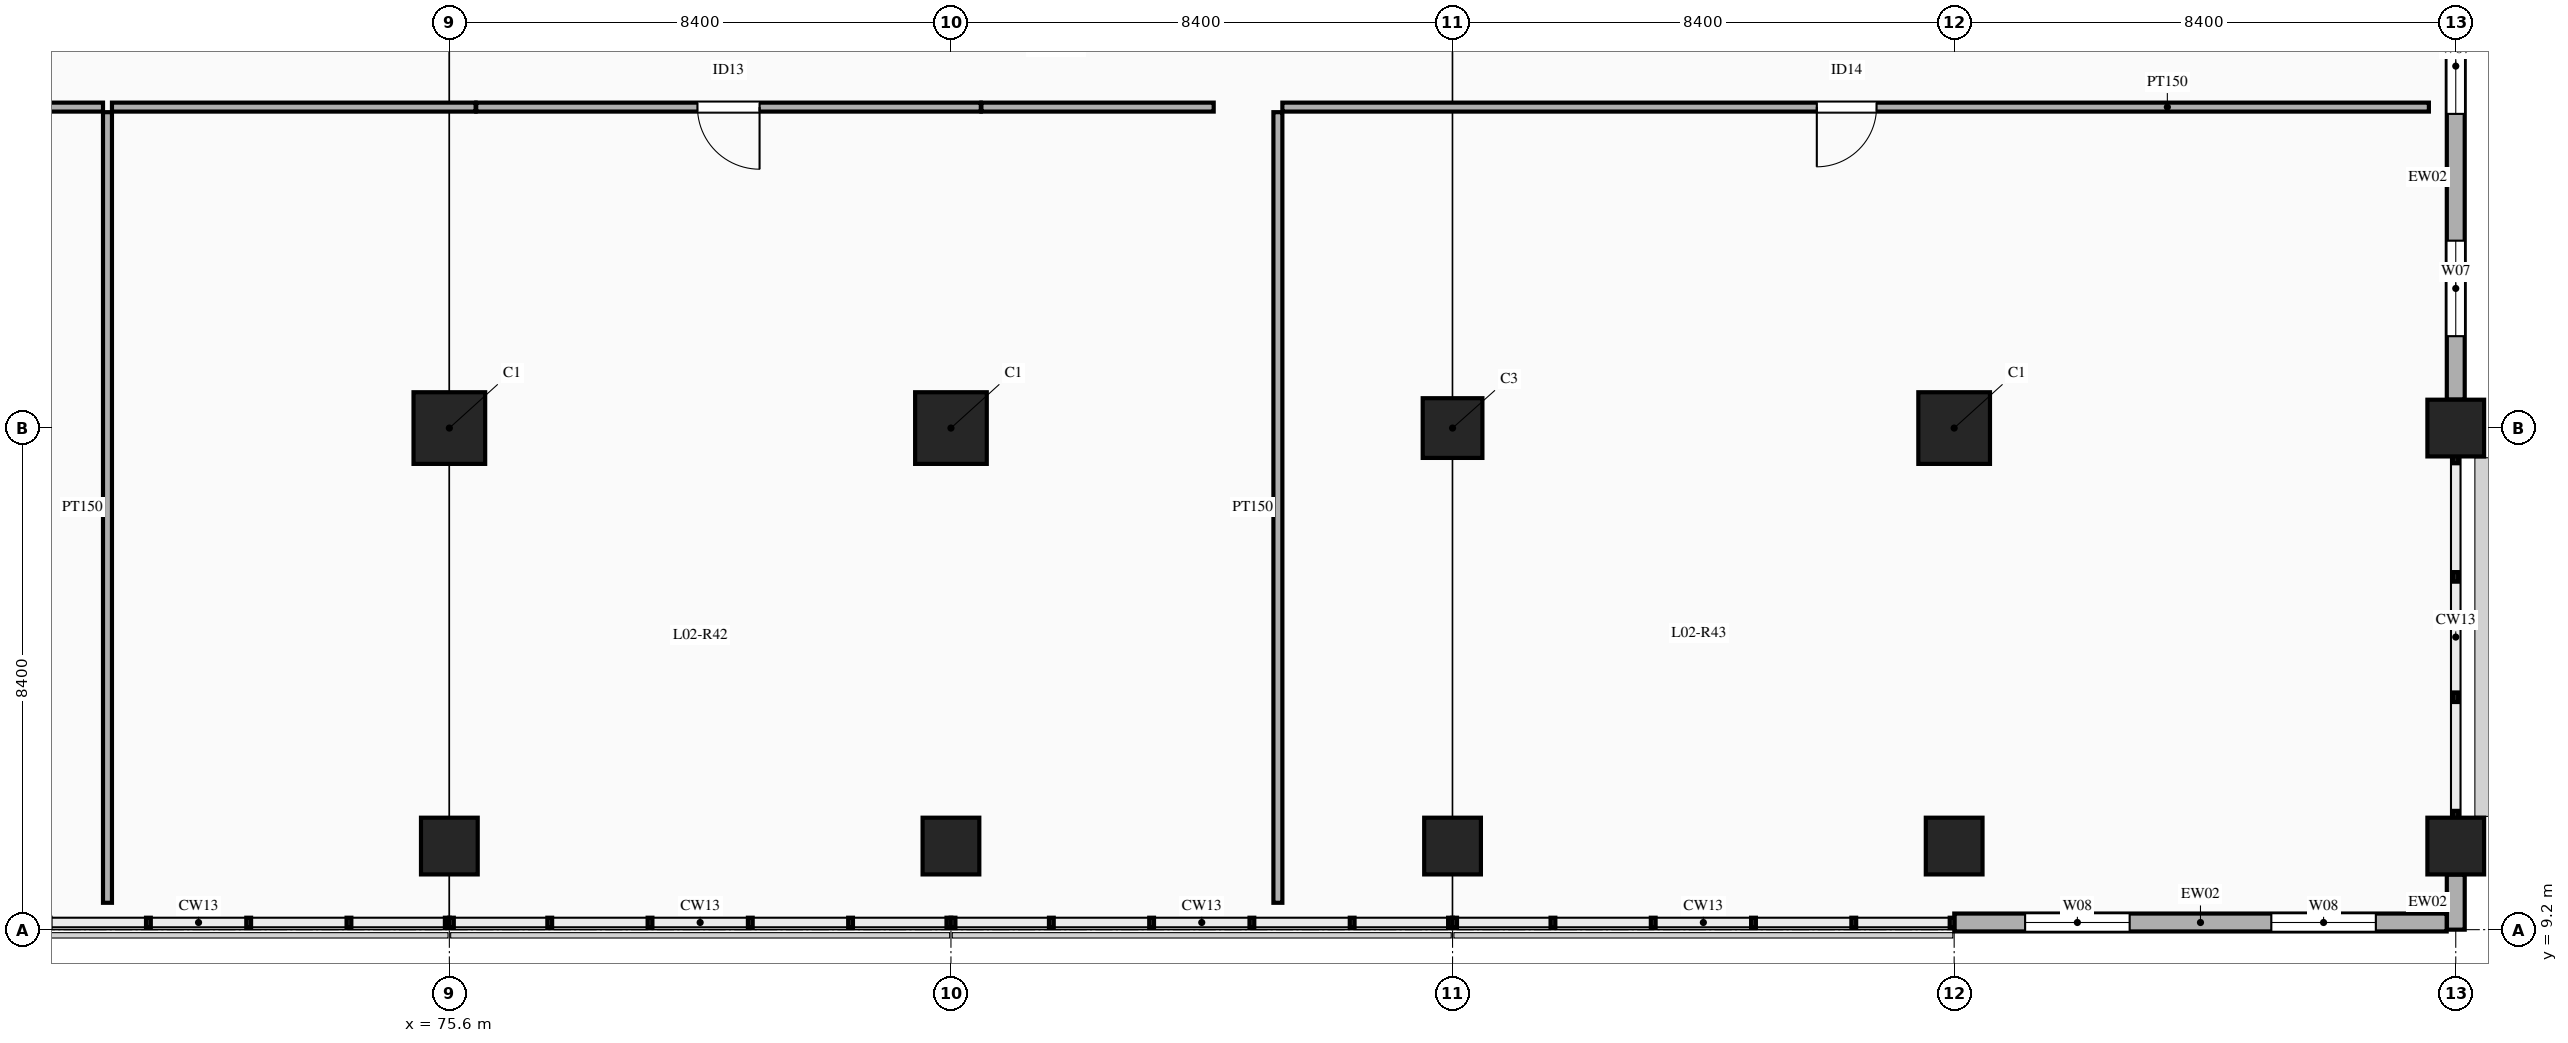
"""IFC4 building model, lengths in metres.
Left out: names, types, materials, properties, quantities, classifications, styles, units other than length and angle.
Written with IfcOpenShell. Run it as: python <this file> out.ifc"""

import sys

from ifc_helpers import new_model, si_unit, direction, frame, frame_2d, origin, origin_2d, place, context, subcontext, project, spatial, rectangle, extrude, element, fill, save


model = new_model("IFC4")
c1 = context("Model", 3, precision=1e-05, world=origin(), true_north=direction((0.0, 1.0)))
c2 = subcontext(c1, "Body", "Model", "MODEL_VIEW")
j1 = project(units=[si_unit("LENGTHUNIT", "METRE"), si_unit("PLANEANGLEUNIT", "RADIAN")], contexts=[c1])
p1 = place(None, origin())
s1 = spatial("IfcSite", under=j1, at=p1, CompositionType="ELEMENT")
p2 = place(p1, origin())
s2 = spatial("IfcBuilding", under=s1, at=p2, CompositionType="ELEMENT")
p3 = place(p2, frame((0.0, 0.0, 10.2)))
s3 = spatial("IfcBuildingStorey", under=s2, at=p3, CompositionType="ELEMENT", Elevation=10.2)
p4 = place(p3, frame((75.6, 10.6, 0.0), z_axis=(0.0, 0.0, 1.0), x_axis=(1.0, 0.0, 0.0)))
e1 = element("IfcColumn", 1, at=p4, inside=s3, PredefinedType="COLUMN", context=c2, shape_type="SweptSolid", body=[
    extrude(rectangle(XDim=0.95, YDim=0.95, at=origin_2d()), origin(), (0.0, 0.0, 1.0), 4.8),
])
p5 = place(p3, frame((75.6, 17.6, 0.0), z_axis=(0.0, 0.0, 1.0), x_axis=(1.0, 0.0, 0.0)))
e2 = element("IfcColumn", 2, at=p5, inside=s3, PredefinedType="COLUMN", context=c2, shape_type="SweptSolid", body=[
    extrude(rectangle(XDim=1.2, YDim=1.2, at=origin_2d()), origin(), (0.0, 0.0, 1.0), 4.8),
])
p6 = place(p3, frame((84.0, 10.6, 0.0), z_axis=(0.0, 0.0, 1.0), x_axis=(1.0, 0.0, 0.0)))
e3 = element("IfcColumn", 3, at=p6, inside=s3, PredefinedType="COLUMN", context=c2, shape_type="SweptSolid", body=[
    extrude(rectangle(XDim=0.95, YDim=0.95, at=origin_2d()), origin(), (0.0, 0.0, 1.0), 4.8),
])
p7 = place(p3, frame((84.0, 17.6, 0.0), z_axis=(0.0, 0.0, 1.0), x_axis=(1.0, 0.0, 0.0)))
e4 = element("IfcColumn", 4, at=p7, inside=s3, PredefinedType="COLUMN", context=c2, shape_type="SweptSolid", body=[
    extrude(rectangle(XDim=1.2, YDim=1.2, at=origin_2d()), origin(), (0.0, 0.0, 1.0), 4.8),
])
p8 = place(p3, frame((92.4, 10.6, 0.0), z_axis=(0.0, 0.0, 1.0), x_axis=(1.0, 0.0, 0.0)))
e5 = element("IfcColumn", 5, at=p8, inside=s3, PredefinedType="COLUMN", context=c2, shape_type="SweptSolid", body=[
    extrude(rectangle(XDim=0.95, YDim=0.95, at=origin_2d()), origin(), (0.0, 0.0, 1.0), 4.8),
])
p9 = place(p3, frame((92.4, 17.6, 0.0), z_axis=(0.0, 0.0, 1.0), x_axis=(1.0, 0.0, 0.0)))
e6 = element("IfcColumn", 6, at=p9, inside=s3, PredefinedType="COLUMN", context=c2, shape_type="SweptSolid", body=[
    extrude(rectangle(XDim=1.0, YDim=1.0, at=origin_2d()), origin(), (0.0, 0.0, 1.0), 4.8),
])
p10 = place(p3, frame((100.8, 10.6, 0.0), z_axis=(0.0, 0.0, 1.0), x_axis=(1.0, 0.0, 0.0)))
e7 = element("IfcColumn", 7, at=p10, inside=s3, PredefinedType="COLUMN", context=c2, shape_type="SweptSolid", body=[
    extrude(rectangle(XDim=0.95, YDim=0.95, at=origin_2d()), origin(), (0.0, 0.0, 1.0), 4.8),
])
p11 = place(p3, frame((100.8, 17.6, 0.0), z_axis=(0.0, 0.0, 1.0), x_axis=(1.0, 0.0, 0.0)))
e8 = element("IfcColumn", 8, at=p11, inside=s3, PredefinedType="COLUMN", context=c2, shape_type="SweptSolid", body=[
    extrude(rectangle(XDim=1.2, YDim=1.2, at=origin_2d()), origin(), (0.0, 0.0, 1.0), 4.8),
])
for number, where, z_axis, x_axis in (
    (9, (109.2, 10.6, 0.0), (0.0, 0.0, 1.0), (1.0, 0.0, 0.0)),
    (10, (109.2, 17.6, 0.0), (0.0, 0.0, 1.0), (1.0, 0.0, 0.0)),
):
    element("IfcColumn", number, at=place(p3, frame(where, z_axis=z_axis, x_axis=x_axis)), inside=s3, PredefinedType="COLUMN", context=c2, shape_type="SweptSolid", body=[
        extrude(rectangle(XDim=0.95, YDim=0.95, at=origin_2d()), origin(), (0.0, 0.0, 1.0), 4.8),
    ])
p12 = place(p3, frame((109.2, 9.2, 0.0), z_axis=(0.0, 0.0, 1.0), x_axis=(0.0, 1.0, 0.0)))
e11 = element("IfcWall", 11, at=p12, inside=s3, PredefinedType="SOLIDWALL", context=c2, shape_type="SweptSolid", body=[
    extrude(rectangle(XDim=0.923, YDim=0.3, at=frame_2d((0.461, 0.0))), origin(), (0.0, 0.0, 1.0), 3.85),
])
p13 = place(p3, frame((100.802, 9.32, 0.0), z_axis=(0.0, 0.0, 1.0), x_axis=(1.0, 0.0, 0.0)))
e12 = element("IfcWall", 12, at=p13, inside=s3, PredefinedType="SOLIDWALL", context=c2, shape_type="SweptSolid", body=[
    extrude(rectangle(XDim=8.246, YDim=0.3, at=frame_2d((4.123, 0.0))), origin(), (0.0, 0.0, 1.0), 3.85),
])
p14 = place(p13, frame((1.187, 0.0, 0.9)))
e13 = element("IfcOpeningElement", 13, at=p14, cuts=e12, PredefinedType="OPENING", context=c2, shape_type="SweptSolid", body=[
    extrude(rectangle(XDim=1.75, YDim=2.2, at=frame_2d((0.875, 1.1))), frame((0.0, 0.16, 0.0), z_axis=(0.0, -1.0, 0.0), x_axis=(1.0, 0.0, 0.0)), (0.0, 0.0, 1.0), 0.32),
])
p15 = place(p13, frame((5.31, 0.0, 0.9)))
e14 = element("IfcOpeningElement", 14, at=p15, cuts=e12, PredefinedType="OPENING", context=c2, shape_type="SweptSolid", body=[
    extrude(rectangle(XDim=1.75, YDim=2.2, at=frame_2d((0.875, 1.1))), frame((0.0, 0.16, 0.0), z_axis=(0.0, -1.0, 0.0), x_axis=(1.0, 0.0, 0.0)), (0.0, 0.0, 1.0), 0.32),
])
p16 = place(p3, frame((109.2, 18.077, 0.0), z_axis=(0.0, 0.0, 1.0), x_axis=(0.0, 1.0, 0.0)))
e15 = element("IfcWall", 15, at=p16, inside=s3, PredefinedType="SOLIDWALL", context=c2, shape_type="SweptSolid", body=[
    extrude(rectangle(XDim=7.446, YDim=0.3, at=frame_2d((3.723, 0.0))), origin(), (0.0, 0.0, 1.0), 3.85),
])
p17 = place(p16, frame((1.062, 0.0, 0.9)))
e16 = element("IfcOpeningElement", 16, at=p17, cuts=e15, PredefinedType="OPENING", context=c2, shape_type="SweptSolid", body=[
    extrude(rectangle(XDim=1.6, YDim=2.1, at=frame_2d((0.8, 1.05))), frame((0.0, 0.16, 0.0), z_axis=(0.0, -1.0, 0.0), x_axis=(1.0, 0.0, 0.0)), (0.0, 0.0, 1.0), 0.32),
])
p18 = place(p16, frame((4.784, 0.0, 0.9)))
e17 = element("IfcOpeningElement", 17, at=p18, cuts=e15, PredefinedType="OPENING", context=c2, shape_type="SweptSolid", body=[
    extrude(rectangle(XDim=1.6, YDim=2.1, at=frame_2d((0.8, 1.05))), frame((0.0, 0.16, 0.0), z_axis=(0.0, -1.0, 0.0), x_axis=(1.0, 0.0, 0.0)), (0.0, 0.0, 1.0), 0.32),
])
p19 = place(p3, frame((76.05, 22.975, 0.0), z_axis=(0.0, 0.0, 1.0), x_axis=(1.0, 0.0, 0.0)))
e18 = element("IfcWall", 18, at=p19, inside=s3, PredefinedType="PARTITIONING", context=c2, shape_type="SweptSolid", body=[
    extrude(rectangle(XDim=8.45, YDim=0.15, at=frame_2d((4.225, 0.0))), origin(), (0.0, 0.0, 1.0), 3.75),
])
p20 = place(p19, frame((3.705, 0.0, 0.0)))
e19 = element("IfcOpeningElement", 19, at=p20, cuts=e18, PredefinedType="OPENING", context=c2, shape_type="SweptSolid", body=[
    extrude(rectangle(XDim=1.04, YDim=2.15, at=frame_2d((0.52, 1.075))), frame((0.0, 0.085, 0.0), z_axis=(0.0, -1.0, 0.0), x_axis=(1.0, 0.0, 0.0)), (0.0, 0.0, 1.0), 0.17),
])
p21 = place(p3, frame((84.51, 22.975, 0.0), z_axis=(0.0, 0.0, 1.0), x_axis=(1.0, 0.0, 0.0)))
e20 = element("IfcWall", 20, at=p21, inside=s3, PredefinedType="PARTITIONING", context=c2, shape_type="SweptSolid", body=[
    extrude(rectangle(XDim=3.89, YDim=0.15, at=frame_2d((1.945, 0.0))), origin(), (0.0, 0.0, 1.0), 3.75),
])
p22 = place(p3, frame((50.85, 22.975, 0.0), z_axis=(0.0, 0.0, 1.0), x_axis=(1.0, 0.0, 0.0)))
e21 = element("IfcWall", 21, at=p22, inside=s3, PredefinedType="PARTITIONING", context=c2, shape_type="SweptSolid", body=[
    extrude(rectangle(XDim=18.95, YDim=0.15, at=frame_2d((9.475, 0.0))), origin(), (0.0, 0.0, 1.0), 3.75),
])
p23 = place(p22, frame((9.276, 0.0, 0.0)))
e22 = element("IfcOpeningElement", 22, at=p23, cuts=e21, PredefinedType="OPENING", context=c2, shape_type="SweptSolid", body=[
    extrude(rectangle(XDim=1.0, YDim=2.15, at=frame_2d((0.5, 1.075))), frame((0.0, 0.085, 0.0), z_axis=(0.0, -1.0, 0.0), x_axis=(1.0, 0.0, 0.0)), (0.0, 0.0, 1.0), 0.17),
])
p24 = place(p3, frame((69.95, 22.975, 0.0), z_axis=(0.0, 0.0, 1.0), x_axis=(1.0, 0.0, 0.0)))
e23 = element("IfcWall", 23, at=p24, inside=s3, PredefinedType="PARTITIONING", context=c2, shape_type="SweptSolid", body=[
    extrude(rectangle(XDim=6.09, YDim=0.15, at=frame_2d((3.045, 0.0))), origin(), (0.0, 0.0, 1.0), 3.75),
])
p25 = place(p3, frame((89.55, 22.975, 0.0), z_axis=(0.0, 0.0, 1.0), x_axis=(1.0, 0.0, 0.0)))
e24 = element("IfcWall", 24, at=p25, inside=s3, PredefinedType="PARTITIONING", context=c2, shape_type="SweptSolid", body=[
    extrude(rectangle(XDim=19.2, YDim=0.15, at=frame_2d((9.6, 0.0))), origin(), (0.0, 0.0, 1.0), 3.75),
])
p26 = place(p25, frame((8.95, 0.0, 0.0)))
e25 = element("IfcOpeningElement", 25, at=p26, cuts=e24, PredefinedType="OPENING", context=c2, shape_type="SweptSolid", body=[
    extrude(rectangle(XDim=1.0, YDim=2.15, at=frame_2d((0.5, 1.075))), frame((0.0, 0.085, 0.0), z_axis=(0.0, -1.0, 0.0), x_axis=(1.0, 0.0, 0.0)), (0.0, 0.0, 1.0), 0.17),
])
for number, where, z_axis, x_axis in (
    (26, (69.875, 9.65, 0.0), (0.0, 0.0, 1.0), (0.0, 1.0, 0.0)),
    (27, (89.475, 9.65, 0.0), (0.0, 0.0, 1.0), (0.0, 1.0, 0.0)),
):
    element("IfcWall", number, at=place(p3, frame(where, z_axis=z_axis, x_axis=x_axis)), inside=s3, PredefinedType="PARTITIONING", context=c2, shape_type="SweptSolid", body=[
        extrude(rectangle(XDim=13.24, YDim=0.15, at=frame_2d((6.62, 0.0))), origin(), (0.0, 0.0, 1.0), 3.75),
    ])
p27 = place(p14, origin())
e28 = element("IfcWindow", 28, at=p27, inside=s3, PartitioningType="DOUBLE_PANEL_VERTICAL", PredefinedType="WINDOW", context=c2, shape_type="SweptSolid", body=[
    extrude(rectangle(XDim=1.75, YDim=2.2, at=frame_2d((0.875, 1.1))), frame((0.0, 0.03, 0.0), z_axis=(0.0, -1.0, 0.0), x_axis=(1.0, 0.0, 0.0)), (0.0, 0.0, 1.0), 0.06),
])
fill(e13, e28)
p28 = place(p15, origin())
e29 = element("IfcWindow", 29, at=p28, inside=s3, PartitioningType="DOUBLE_PANEL_VERTICAL", PredefinedType="WINDOW", context=c2, shape_type="SweptSolid", body=[
    extrude(rectangle(XDim=1.75, YDim=2.2, at=frame_2d((0.875, 1.1))), frame((0.0, 0.03, 0.0), z_axis=(0.0, -1.0, 0.0), x_axis=(1.0, 0.0, 0.0)), (0.0, 0.0, 1.0), 0.06),
])
fill(e14, e29)
p29 = place(p17, origin())
e30 = element("IfcWindow", 30, at=p29, inside=s3, PartitioningType="DOUBLE_PANEL_VERTICAL", PredefinedType="WINDOW", context=c2, shape_type="SweptSolid", body=[
    extrude(rectangle(XDim=1.6, YDim=2.1, at=frame_2d((0.8, 1.05))), frame((0.0, 0.03, 0.0), z_axis=(0.0, -1.0, 0.0), x_axis=(1.0, 0.0, 0.0)), (0.0, 0.0, 1.0), 0.06),
])
fill(e16, e30)
p30 = place(p18, origin())
e31 = element("IfcWindow", 31, at=p30, inside=s3, PartitioningType="DOUBLE_PANEL_VERTICAL", PredefinedType="WINDOW", context=c2, shape_type="SweptSolid", body=[
    extrude(rectangle(XDim=1.6, YDim=2.1, at=frame_2d((0.8, 1.05))), frame((0.0, 0.03, 0.0), z_axis=(0.0, -1.0, 0.0), x_axis=(1.0, 0.0, 0.0)), (0.0, 0.0, 1.0), 0.06),
])
fill(e17, e31)
p31 = place(p20, frame((1.04, 0.0, 0.0), z_axis=(0.0, 0.0, 1.0), x_axis=(-1.0, 0.0, 0.0)))
e32 = element("IfcDoor", 32, at=p31, inside=s3, OperationType="SINGLE_SWING_LEFT", PredefinedType="DOOR", context=c2, shape_type="SweptSolid", body=[
    extrude(rectangle(XDim=1.04, YDim=2.15, at=frame_2d((0.52, 1.075))), frame((0.0, 0.025, 0.0), z_axis=(0.0, -1.0, 0.0), x_axis=(1.0, 0.0, 0.0)), (0.0, 0.0, 1.0), 0.05),
])
fill(e19, e32)
p32 = place(p26, frame((1.0, 0.0, 0.0), z_axis=(0.0, 0.0, 1.0), x_axis=(-1.0, 0.0, 0.0)))
e33 = element("IfcDoor", 33, at=p32, inside=s3, OperationType="SINGLE_SWING_RIGHT", PredefinedType="DOOR", context=c2, shape_type="SweptSolid", body=[
    extrude(rectangle(XDim=1.0, YDim=2.15, at=frame_2d((0.5, 1.075))), frame((0.0, 0.025, 0.0), z_axis=(0.0, -1.0, 0.0), x_axis=(1.0, 0.0, 0.0)), (0.0, 0.0, 1.0), 0.05),
])
fill(e25, e33)
save(model, sys.argv[1])
